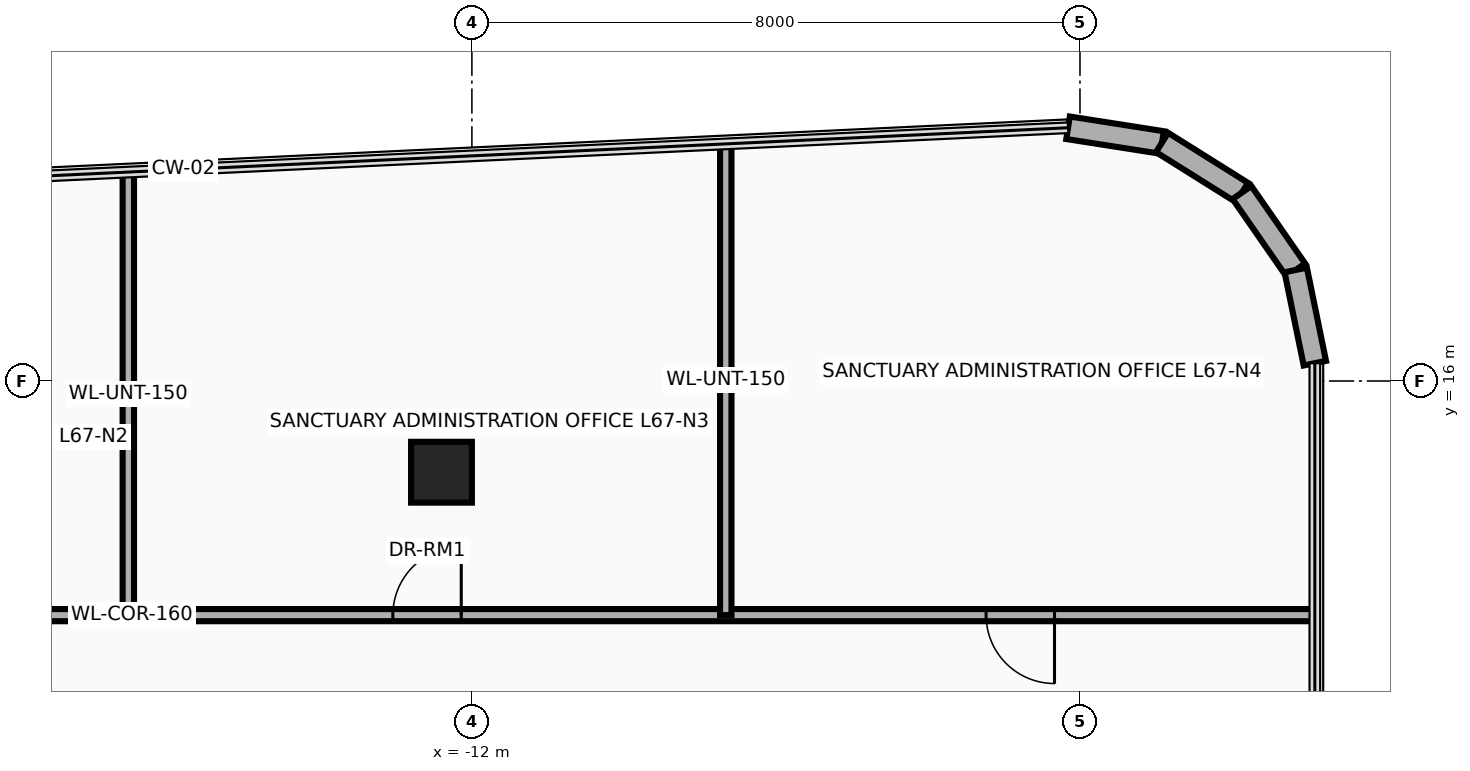
"""IFC4 building model, lengths in metres.
Left out: names, types, materials, properties, quantities, classifications, styles, units other than length and angle.
Written with IfcOpenShell. Run it as: python <this file> out.ifc"""

import sys

from ifc_helpers import new_model, si_unit, direction, frame, frame_2d, origin, origin_2d, place, context, subcontext, project, spatial, rectangle, extrude, source, transform, mapped, element, fill, save


model = new_model("IFC4")
c1 = context("Model", 3, precision=1e-05, world=origin(), true_north=direction((0.0, 1.0)))
c2 = subcontext(c1, "Body", "Model", "MODEL_VIEW")
j1 = project(units=[si_unit("LENGTHUNIT", "METRE"), si_unit("PLANEANGLEUNIT", "RADIAN")], contexts=[c1])
p1 = place(None, origin())
s1 = spatial("IfcSite", under=j1, at=p1, CompositionType="ELEMENT")
p2 = place(p1, origin())
s2 = spatial("IfcBuilding", under=s1, at=p2, CompositionType="ELEMENT")
p3 = place(p2, frame((0.0, 0.0, 258.0)))
s3 = spatial("IfcBuildingStorey", under=s2, at=p3, CompositionType="ELEMENT", Elevation=258.0)
m1 = source(origin(), c2, "Body", "SweptSolid", [
    extrude(rectangle(XDim=0.8, YDim=0.8, at=origin_2d()), origin(), (0.0, 0.0, 1.0), 3.5),
])
p4 = place(p3, frame((-12.4, 14.8, 0.0), z_axis=(0.0, 0.0, 1.0), x_axis=(1.0, 0.0, 0.0)))
e1 = element("IfcColumn", 1, at=p4, inside=s3, PredefinedType="COLUMN", context=c2, shape_type="MappedRepresentation", body=[
    mapped(m1, transform((0.0, 0.0, 0.0), x_axis=(1.0, 0.0, 0.0), y_axis=(0.0, 1.0, 0.0), z_axis=(0.0, 0.0, 1.0), scale=1.0)),
])
p5 = place(p3, frame((-4.157, 19.332, 0.0), z_axis=(0.0, 0.0, 1.0), x_axis=(0.987969236552, -0.15465053387, 0.0)))
e2 = element("IfcWall", 2, at=p5, inside=s3, PredefinedType="SOLIDWALL", context=c2, shape_type="SweptSolid", body=[
    extrude(rectangle(XDim=1.252, YDim=0.3, at=frame_2d((0.626, 0.0))), origin(), (0.0, 0.0, 1.0), 3.26),
])
for number, where, z_axis, x_axis in (
    (3, (-2.92, 19.138, 0.0), (0.0, 0.0, 1.0), (0.847, -0.531, 0.0)),
    (4, (-1.869, 18.48, 0.0), (0.0, 0.0, 1.0), (0.57, -0.822, 0.0)),
):
    element("IfcWall", number, at=place(p3, frame(where, z_axis=z_axis, x_axis=x_axis)), inside=s3, PredefinedType="SOLIDWALL", context=c2, shape_type="SweptSolid", body=[
        extrude(rectangle(XDim=1.24, YDim=0.3, at=frame_2d((0.62, 0.0))), origin(), (0.0, 0.0, 1.0), 3.26),
    ])
p6 = place(p3, frame((-1.161, 17.461, 0.0), z_axis=(0.0, 0.0, 1.0), x_axis=(0.20087696073, -0.979616479367, 0.0)))
e5 = element("IfcWall", 5, at=p6, inside=s3, PredefinedType="SOLIDWALL", context=c2, shape_type="SweptSolid", body=[
    extrude(rectangle(XDim=1.252, YDim=0.3, at=frame_2d((0.626, 0.0))), origin(), (0.0, 0.0, 1.0), 3.26),
])
p7 = place(p3, frame((-32.04, 12.92, 0.0), z_axis=(0.0, 0.0, 1.0), x_axis=(1.0, 0.0, 0.0)))
e6 = element("IfcWall", 6, at=p7, inside=s3, PredefinedType="PARTITIONING", context=c2, shape_type="SweptSolid", body=[
    extrude(rectangle(XDim=31.13, YDim=0.16, at=frame_2d((15.565, 0.0))), origin(), (0.0, 0.0, 1.0), 2.634),
])
p8 = place(p7, frame((3.38, 0.0, 0.0)))
e7 = element("IfcOpeningElement", 7, at=p8, cuts=e6, PredefinedType="OPENING", context=c2, shape_type="SweptSolid", body=[
    extrude(rectangle(XDim=0.9, YDim=2.1, at=frame_2d((0.45, 1.05))), frame((0.0, 0.095, 0.0), z_axis=(0.0, -1.0, 0.0), x_axis=(1.0, 0.0, 0.0)), (0.0, 0.0, 1.0), 0.19),
])
p9 = place(p7, frame((11.14, 0.0, 0.0)))
e8 = element("IfcOpeningElement", 8, at=p9, cuts=e6, PredefinedType="OPENING", context=c2, shape_type="SweptSolid", body=[
    extrude(rectangle(XDim=0.9, YDim=2.1, at=frame_2d((0.45, 1.05))), frame((0.0, 0.095, 0.0), z_axis=(0.0, -1.0, 0.0), x_axis=(1.0, 0.0, 0.0)), (0.0, 0.0, 1.0), 0.19),
])
p10 = place(p7, frame((19.0, 0.0, 0.0)))
e9 = element("IfcOpeningElement", 9, at=p10, cuts=e6, PredefinedType="OPENING", context=c2, shape_type="SweptSolid", body=[
    extrude(rectangle(XDim=0.9, YDim=2.1, at=frame_2d((0.45, 1.05))), frame((0.0, 0.095, 0.0), z_axis=(0.0, -1.0, 0.0), x_axis=(1.0, 0.0, 0.0)), (0.0, 0.0, 1.0), 0.19),
])
p11 = place(p7, frame((26.805, 0.0, 0.0)))
e10 = element("IfcOpeningElement", 10, at=p11, cuts=e6, PredefinedType="OPENING", context=c2, shape_type="SweptSolid", body=[
    extrude(rectangle(XDim=0.9, YDim=2.1, at=frame_2d((0.45, 1.05))), frame((0.0, 0.095, 0.0), z_axis=(0.0, -1.0, 0.0), x_axis=(1.0, 0.0, 0.0)), (0.0, 0.0, 1.0), 0.19),
])
p12 = place(p3, frame((-16.52, 12.92, 0.0), z_axis=(0.0, 0.0, 1.0), x_axis=(0.0, 1.0, 0.0)))
e11 = element("IfcWall", 11, at=p12, inside=s3, PredefinedType="PARTITIONING", context=c2, shape_type="SweptSolid", body=[
    extrude(rectangle(XDim=5.829, YDim=0.15, at=frame_2d((2.915, 0.0))), origin(), (0.0, 0.0, 1.0), 2.623),
])
p13 = place(p3, frame((-8.66, 12.92, 0.0), z_axis=(0.0, 0.0, 1.0), x_axis=(0.0, 1.0, 0.0)))
e12 = element("IfcWall", 12, at=p13, inside=s3, PredefinedType="PARTITIONING", context=c2, shape_type="SweptSolid", body=[
    extrude(rectangle(XDim=6.199, YDim=0.15, at=frame_2d((3.1, 0.0))), origin(), (0.0, 0.0, 1.0), 3.26),
])
p14 = place(p10, origin())
e13 = element("IfcDoor", 13, at=p14, inside=s3, OperationType="SINGLE_SWING_RIGHT", PredefinedType="DOOR", context=c2, shape_type="SweptSolid", body=[
    extrude(rectangle(XDim=0.9, YDim=2.1, at=frame_2d((0.45, 1.05))), frame((0.0, 0.025, 0.0), z_axis=(0.0, -1.0, 0.0), x_axis=(1.0, 0.0, 0.0)), (0.0, 0.0, 1.0), 0.05),
])
fill(e9, e13)
p15 = place(p11, frame((0.9, 0.0, 0.0), z_axis=(0.0, 0.0, 1.0), x_axis=(-1.0, 0.0, 0.0)))
e14 = element("IfcDoor", 14, at=p15, inside=s3, OperationType="SINGLE_SWING_LEFT", PredefinedType="DOOR", context=c2, shape_type="SweptSolid", body=[
    extrude(rectangle(XDim=0.9, YDim=2.1, at=frame_2d((0.45, 1.05))), frame((0.0, 0.025, 0.0), z_axis=(0.0, -1.0, 0.0), x_axis=(1.0, 0.0, 0.0)), (0.0, 0.0, 1.0), 0.05),
])
fill(e10, e14)
save(model, sys.argv[1])
